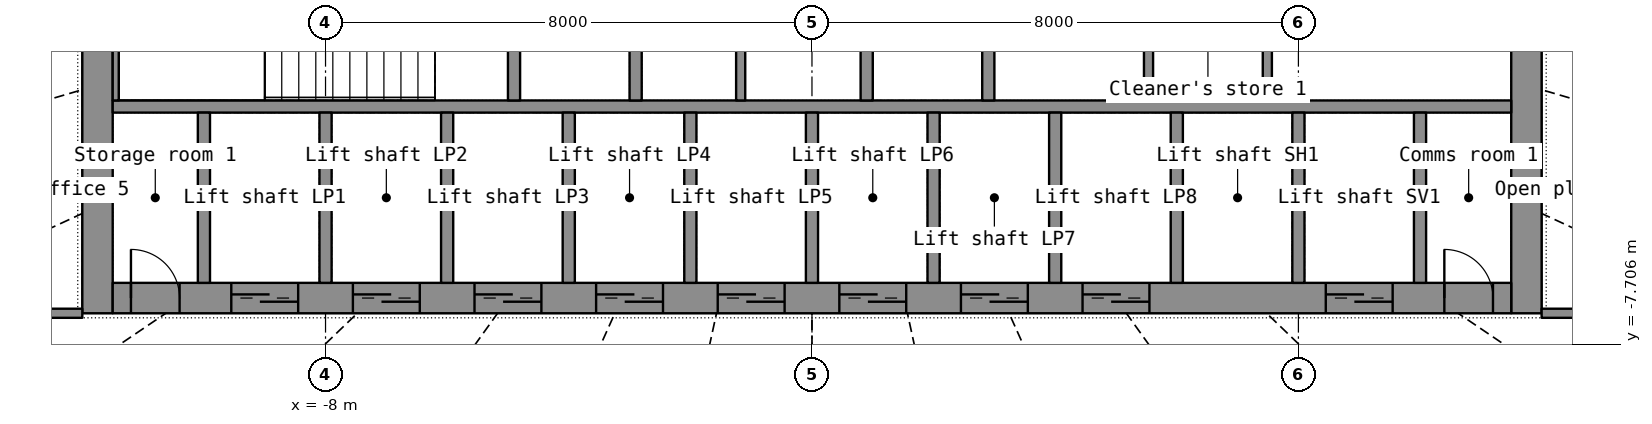
"""IFC4 building model, lengths in metres.
Left out: names, types, materials, properties, quantities, classifications, styles, units other than length and angle.
Written with IfcOpenShell. Run it as: python <this file> out.ifc"""

import sys

from ifc_helpers import new_model, si_unit, direction, frame, frame_2d, origin, place, context, subcontext, project, spatial, rectangle, extrude, element, fill, save


model = new_model("IFC4")
c1 = context("Model", 3, precision=1e-05, world=origin(), true_north=direction((0.0, 1.0)))
c2 = subcontext(c1, "Body", "Model", "MODEL_VIEW")
j1 = project(units=[si_unit("LENGTHUNIT", "METRE"), si_unit("PLANEANGLEUNIT", "RADIAN")], contexts=[c1])
p1 = place(None, origin())
s1 = spatial("IfcSite", under=j1, at=p1, CompositionType="ELEMENT")
p2 = place(p1, origin())
s2 = spatial("IfcBuilding", under=s1, at=p2, CompositionType="ELEMENT")
p3 = place(p2, frame((0.0, 0.0, 104.5)))
s3 = spatial("IfcBuildingStorey", under=s2, at=p3, CompositionType="ELEMENT", Elevation=104.5)
p4 = place(p3, frame((-11.75, -7.2, 0.0), z_axis=(0.0, 0.0, 1.0), x_axis=(0.0, 1.0, 0.0)))
e1 = element("IfcWall", 1, at=p4, inside=s3, PredefinedType="SHEAR", context=c2, shape_type="SweptSolid", body=[
    extrude(rectangle(XDim=14.4, YDim=0.5, at=frame_2d((7.2, 0.0))), origin(), (0.0, 0.0, 1.0), 3.3),
])
p5 = place(p4, frame((6.5, 0.0, 0.0)))
e2 = element("IfcOpeningElement", 2, at=p5, cuts=e1, PredefinedType="OPENING", context=c2, shape_type="SweptSolid", body=[
    extrude(rectangle(XDim=1.4, YDim=2.2, at=frame_2d((0.7, 1.1))), frame((0.0, 0.26, 0.0), z_axis=(0.0, -1.0, 0.0), x_axis=(1.0, 0.0, 0.0)), (0.0, 0.0, 1.0), 0.52),
])
p6 = place(p3, frame((11.75, -7.2, 0.0), z_axis=(0.0, 0.0, 1.0), x_axis=(0.0, 1.0, 0.0)))
e3 = element("IfcWall", 3, at=p6, inside=s3, PredefinedType="SHEAR", context=c2, shape_type="SweptSolid", body=[
    extrude(rectangle(XDim=14.4, YDim=0.5, at=frame_2d((7.2, 0.0))), origin(), (0.0, 0.0, 1.0), 3.3),
])
p7 = place(p6, frame((6.5, 0.0, 0.0)))
e4 = element("IfcOpeningElement", 4, at=p7, cuts=e3, PredefinedType="OPENING", context=c2, shape_type="SweptSolid", body=[
    extrude(rectangle(XDim=1.4, YDim=2.2, at=frame_2d((0.7, 1.1))), frame((0.0, 0.26, 0.0), z_axis=(0.0, -1.0, 0.0), x_axis=(1.0, 0.0, 0.0)), (0.0, 0.0, 1.0), 0.52),
])
p8 = place(p3, frame((-11.5, -6.95, 0.0), z_axis=(0.0, 0.0, 1.0), x_axis=(1.0, 0.0, 0.0)))
e5 = element("IfcWall", 5, at=p8, inside=s3, PredefinedType="SHEAR", context=c2, shape_type="SweptSolid", body=[
    extrude(rectangle(XDim=23.0, YDim=0.5, at=frame_2d((11.5, 0.0))), origin(), (0.0, 0.0, 1.0), 3.3),
])
p9 = place(p8, frame((1.95, 0.0, 0.0)))
e6 = element("IfcOpeningElement", 6, at=p9, cuts=e5, PredefinedType="OPENING", context=c2, shape_type="SweptSolid", body=[
    extrude(rectangle(XDim=1.1, YDim=2.2, at=frame_2d((0.55, 1.1))), frame((0.0, 0.26, 0.0), z_axis=(0.0, -1.0, 0.0), x_axis=(1.0, 0.0, 0.0)), (0.0, 0.0, 1.0), 0.52),
])
p10 = place(p8, frame((3.95, 0.0, 0.0)))
e7 = element("IfcOpeningElement", 7, at=p10, cuts=e5, PredefinedType="OPENING", context=c2, shape_type="SweptSolid", body=[
    extrude(rectangle(XDim=1.1, YDim=2.2, at=frame_2d((0.55, 1.1))), frame((0.0, 0.26, 0.0), z_axis=(0.0, -1.0, 0.0), x_axis=(1.0, 0.0, 0.0)), (0.0, 0.0, 1.0), 0.52),
])
p11 = place(p8, frame((5.95, 0.0, 0.0)))
e8 = element("IfcOpeningElement", 8, at=p11, cuts=e5, PredefinedType="OPENING", context=c2, shape_type="SweptSolid", body=[
    extrude(rectangle(XDim=1.1, YDim=2.2, at=frame_2d((0.55, 1.1))), frame((0.0, 0.26, 0.0), z_axis=(0.0, -1.0, 0.0), x_axis=(1.0, 0.0, 0.0)), (0.0, 0.0, 1.0), 0.52),
])
p12 = place(p8, frame((7.95, 0.0, 0.0)))
e9 = element("IfcOpeningElement", 9, at=p12, cuts=e5, PredefinedType="OPENING", context=c2, shape_type="SweptSolid", body=[
    extrude(rectangle(XDim=1.1, YDim=2.2, at=frame_2d((0.55, 1.1))), frame((0.0, 0.26, 0.0), z_axis=(0.0, -1.0, 0.0), x_axis=(1.0, 0.0, 0.0)), (0.0, 0.0, 1.0), 0.52),
])
p13 = place(p8, frame((9.95, 0.0, 0.0)))
e10 = element("IfcOpeningElement", 10, at=p13, cuts=e5, PredefinedType="OPENING", context=c2, shape_type="SweptSolid", body=[
    extrude(rectangle(XDim=1.1, YDim=2.2, at=frame_2d((0.55, 1.1))), frame((0.0, 0.26, 0.0), z_axis=(0.0, -1.0, 0.0), x_axis=(1.0, 0.0, 0.0)), (0.0, 0.0, 1.0), 0.52),
])
p14 = place(p8, frame((11.95, 0.0, 0.0)))
e11 = element("IfcOpeningElement", 11, at=p14, cuts=e5, PredefinedType="OPENING", context=c2, shape_type="SweptSolid", body=[
    extrude(rectangle(XDim=1.1, YDim=2.2, at=frame_2d((0.55, 1.1))), frame((0.0, 0.26, 0.0), z_axis=(0.0, -1.0, 0.0), x_axis=(1.0, 0.0, 0.0)), (0.0, 0.0, 1.0), 0.52),
])
p15 = place(p8, frame((13.95, 0.0, 0.0)))
e12 = element("IfcOpeningElement", 12, at=p15, cuts=e5, PredefinedType="OPENING", context=c2, shape_type="SweptSolid", body=[
    extrude(rectangle(XDim=1.1, YDim=2.2, at=frame_2d((0.55, 1.1))), frame((0.0, 0.26, 0.0), z_axis=(0.0, -1.0, 0.0), x_axis=(1.0, 0.0, 0.0)), (0.0, 0.0, 1.0), 0.52),
])
p16 = place(p8, frame((15.95, 0.0, 0.0)))
e13 = element("IfcOpeningElement", 13, at=p16, cuts=e5, PredefinedType="OPENING", context=c2, shape_type="SweptSolid", body=[
    extrude(rectangle(XDim=1.1, YDim=2.2, at=frame_2d((0.55, 1.1))), frame((0.0, 0.26, 0.0), z_axis=(0.0, -1.0, 0.0), x_axis=(1.0, 0.0, 0.0)), (0.0, 0.0, 1.0), 0.52),
])
p17 = place(p8, frame((19.95, 0.0, 0.0)))
e14 = element("IfcOpeningElement", 14, at=p17, cuts=e5, PredefinedType="OPENING", context=c2, shape_type="SweptSolid", body=[
    extrude(rectangle(XDim=1.1, YDim=2.2, at=frame_2d((0.55, 1.1))), frame((0.0, 0.26, 0.0), z_axis=(0.0, -1.0, 0.0), x_axis=(1.0, 0.0, 0.0)), (0.0, 0.0, 1.0), 0.52),
])
p18 = place(p8, frame((0.3, 0.0, 0.0)))
e15 = element("IfcOpeningElement", 15, at=p18, cuts=e5, PredefinedType="OPENING", context=c2, shape_type="SweptSolid", body=[
    extrude(rectangle(XDim=0.8, YDim=2.05, at=frame_2d((0.4, 1.025))), frame((0.0, 0.26, 0.0), z_axis=(0.0, -1.0, 0.0), x_axis=(1.0, 0.0, 0.0)), (0.0, 0.0, 1.0), 0.52),
])
p19 = place(p8, frame((21.9, 0.0, 0.0)))
e16 = element("IfcOpeningElement", 16, at=p19, cuts=e5, PredefinedType="OPENING", context=c2, shape_type="SweptSolid", body=[
    extrude(rectangle(XDim=0.8, YDim=2.05, at=frame_2d((0.4, 1.025))), frame((0.0, 0.26, 0.0), z_axis=(0.0, -1.0, 0.0), x_axis=(1.0, 0.0, 0.0)), (0.0, 0.0, 1.0), 0.52),
])
p20 = place(p3, frame((-11.5, -3.8, 0.0), z_axis=(0.0, 0.0, 1.0), x_axis=(1.0, 0.0, 0.0)))
e17 = element("IfcWall", 17, at=p20, inside=s3, PredefinedType="SHEAR", context=c2, shape_type="SweptSolid", body=[
    extrude(rectangle(XDim=23.0, YDim=0.2, at=frame_2d((11.5, 0.0))), origin(), (0.0, 0.0, 1.0), 3.3),
])
for number, where, z_axis, x_axis in (
    (18, (-10.0, -6.7, 0.0), (0.0, 0.0, 1.0), (0.0, 1.0, 0.0)),
    (19, (-8.0, -6.7, 0.0), (0.0, 0.0, 1.0), (0.0, 1.0, 0.0)),
    (20, (-6.0, -6.7, 0.0), (0.0, 0.0, 1.0), (0.0, 1.0, 0.0)),
    (21, (-4.0, -6.7, 0.0), (0.0, 0.0, 1.0), (0.0, 1.0, 0.0)),
    (22, (-2.0, -6.7, 0.0), (0.0, 0.0, 1.0), (0.0, 1.0, 0.0)),
    (23, (0.0, -6.7, 0.0), (0.0, 0.0, 1.0), (0.0, 1.0, 0.0)),
    (24, (2.0, -6.7, 0.0), (0.0, 0.0, 1.0), (0.0, 1.0, 0.0)),
    (25, (4.0, -6.7, 0.0), (0.0, 0.0, 1.0), (0.0, 1.0, 0.0)),
    (26, (6.0, -6.7, 0.0), (0.0, 0.0, 1.0), (0.0, 1.0, 0.0)),
    (27, (8.0, -6.7, 0.0), (0.0, 0.0, 1.0), (0.0, 1.0, 0.0)),
    (28, (10.0, -6.7, 0.0), (0.0, 0.0, 1.0), (0.0, 1.0, 0.0)),
):
    element("IfcWall", number, at=place(p3, frame(where, z_axis=z_axis, x_axis=x_axis)), inside=s3, PredefinedType="SHEAR", context=c2, shape_type="SweptSolid", body=[
        extrude(rectangle(XDim=2.8, YDim=0.2, at=frame_2d((1.4, 0.0))), origin(), (0.0, 0.0, 1.0), 3.3),
    ])
p21 = place(p3, frame((-2.9, -3.7, 0.0), z_axis=(0.0, 0.0, 1.0), x_axis=(0.0, 1.0, 0.0)))
e29 = element("IfcWall", 29, at=p21, inside=s3, PredefinedType="SHEAR", context=c2, shape_type="SweptSolid", body=[
    extrude(rectangle(XDim=7.4, YDim=0.2, at=frame_2d((3.7, 0.0))), origin(), (0.0, 0.0, 1.0), 3.3),
])
p22 = place(p21, frame((3.1, 0.0, 0.0)))
e30 = element("IfcOpeningElement", 30, at=p22, cuts=e29, PredefinedType="OPENING", context=c2, shape_type="SweptSolid", body=[
    extrude(rectangle(XDim=1.2, YDim=2.2, at=frame_2d((0.6, 1.1))), frame((0.0, 0.11, 0.0), z_axis=(0.0, -1.0, 0.0), x_axis=(1.0, 0.0, 0.0)), (0.0, 0.0, 1.0), 0.22),
])
p23 = place(p3, frame((2.9, -3.7, 0.0), z_axis=(0.0, 0.0, 1.0), x_axis=(0.0, 1.0, 0.0)))
e31 = element("IfcWall", 31, at=p23, inside=s3, PredefinedType="SHEAR", context=c2, shape_type="SweptSolid", body=[
    extrude(rectangle(XDim=7.4, YDim=0.2, at=frame_2d((3.7, 0.0))), origin(), (0.0, 0.0, 1.0), 3.3),
])
p24 = place(p23, frame((3.1, 0.0, 0.0)))
e32 = element("IfcOpeningElement", 32, at=p24, cuts=e31, PredefinedType="OPENING", context=c2, shape_type="SweptSolid", body=[
    extrude(rectangle(XDim=1.2, YDim=2.2, at=frame_2d((0.6, 1.1))), frame((0.0, 0.11, 0.0), z_axis=(0.0, -1.0, 0.0), x_axis=(1.0, 0.0, 0.0)), (0.0, 0.0, 1.0), 0.22),
])
p25 = place(p3, frame((0.9, -3.7, 0.0), z_axis=(0.0, 0.0, 1.0), x_axis=(0.0, 1.0, 0.0)))
e33 = element("IfcWall", 33, at=p25, inside=s3, PredefinedType="SHEAR", context=c2, shape_type="SweptSolid", body=[
    extrude(rectangle(XDim=2.35, YDim=0.2, at=frame_2d((1.175, 0.0))), origin(), (0.0, 0.0, 1.0), 3.3),
])
p26 = place(p3, frame((-11.45, -3.7, 0.0), z_axis=(0.0, 0.0, 1.0), x_axis=(0.0, 1.0, 0.0)))
e34 = element("IfcWall", 34, at=p26, inside=s3, PredefinedType="SHEAR", context=c2, shape_type="SweptSolid", body=[
    extrude(rectangle(XDim=2.35, YDim=0.1, at=frame_2d((1.175, 0.0))), origin(), (0.0, 0.0, 1.0), 3.3),
])
p27 = place(p3, frame((-4.9, -3.7, 0.0), z_axis=(0.0, 0.0, 1.0), x_axis=(0.0, 1.0, 0.0)))
e35 = element("IfcWall", 35, at=p27, inside=s3, PredefinedType="SHEAR", context=c2, shape_type="SweptSolid", body=[
    extrude(rectangle(XDim=2.35, YDim=0.2, at=frame_2d((1.175, 0.0))), origin(), (0.0, 0.0, 1.0), 3.3),
])
for number, where, z_axis, x_axis in (
    (36, (5.535, -3.7, 0.0), (0.0, 0.0, 1.0), (0.0, 1.0, 0.0)),
    (37, (7.489, -3.7, 0.0), (0.0, 0.0, 1.0), (0.0, 1.0, 0.0)),
    (38, (-1.173, -3.7, 0.0), (0.0, 0.0, 1.0), (0.0, 1.0, 0.0)),
):
    element("IfcWall", number, at=place(p3, frame(where, z_axis=z_axis, x_axis=x_axis)), inside=s3, PredefinedType="PARTITIONING", context=c2, shape_type="SweptSolid", body=[
        extrude(rectangle(XDim=2.35, YDim=0.15, at=frame_2d((1.175, 0.0))), origin(), (0.0, 0.0, 1.0), 3.3),
    ])
for number, where, z_axis, x_axis in (
    (39, (-12.0, -7.2, 0.0), (0.0, 0.0, 1.0), (-1.0, 0.0, 0.0)),
    (40, (15.923, -7.2, 0.0), (0.0, 0.0, 1.0), (-1.0, 0.0, 0.0)),
):
    element("IfcWall", number, at=place(p3, frame(where, z_axis=z_axis, x_axis=x_axis)), inside=s3, PredefinedType="PARTITIONING", context=c2, shape_type="SweptSolid", body=[
        extrude(rectangle(XDim=3.923, YDim=0.15, at=frame_2d((1.961, 0.0))), origin(), (0.0, 0.0, 1.0), 2.4),
    ])
p28 = place(p9, origin())
e41 = element("IfcDoor", 41, at=p28, inside=s3, OperationType="DOUBLE_DOOR_SLIDING", PredefinedType="DOOR", context=c2, shape_type="SweptSolid", body=[
    extrude(rectangle(XDim=1.1, YDim=2.2, at=frame_2d((0.55, 1.1))), frame((0.0, 0.025, 0.0), z_axis=(0.0, -1.0, 0.0), x_axis=(1.0, 0.0, 0.0)), (0.0, 0.0, 1.0), 0.05),
])
fill(e6, e41)
p29 = place(p10, origin())
e42 = element("IfcDoor", 42, at=p29, inside=s3, OperationType="DOUBLE_DOOR_SLIDING", PredefinedType="DOOR", context=c2, shape_type="SweptSolid", body=[
    extrude(rectangle(XDim=1.1, YDim=2.2, at=frame_2d((0.55, 1.1))), frame((0.0, 0.025, 0.0), z_axis=(0.0, -1.0, 0.0), x_axis=(1.0, 0.0, 0.0)), (0.0, 0.0, 1.0), 0.05),
])
fill(e7, e42)
p30 = place(p11, origin())
e43 = element("IfcDoor", 43, at=p30, inside=s3, OperationType="DOUBLE_DOOR_SLIDING", PredefinedType="DOOR", context=c2, shape_type="SweptSolid", body=[
    extrude(rectangle(XDim=1.1, YDim=2.2, at=frame_2d((0.55, 1.1))), frame((0.0, 0.025, 0.0), z_axis=(0.0, -1.0, 0.0), x_axis=(1.0, 0.0, 0.0)), (0.0, 0.0, 1.0), 0.05),
])
fill(e8, e43)
p31 = place(p12, origin())
e44 = element("IfcDoor", 44, at=p31, inside=s3, OperationType="DOUBLE_DOOR_SLIDING", PredefinedType="DOOR", context=c2, shape_type="SweptSolid", body=[
    extrude(rectangle(XDim=1.1, YDim=2.2, at=frame_2d((0.55, 1.1))), frame((0.0, 0.025, 0.0), z_axis=(0.0, -1.0, 0.0), x_axis=(1.0, 0.0, 0.0)), (0.0, 0.0, 1.0), 0.05),
])
fill(e9, e44)
p32 = place(p13, origin())
e45 = element("IfcDoor", 45, at=p32, inside=s3, OperationType="DOUBLE_DOOR_SLIDING", PredefinedType="DOOR", context=c2, shape_type="SweptSolid", body=[
    extrude(rectangle(XDim=1.1, YDim=2.2, at=frame_2d((0.55, 1.1))), frame((0.0, 0.025, 0.0), z_axis=(0.0, -1.0, 0.0), x_axis=(1.0, 0.0, 0.0)), (0.0, 0.0, 1.0), 0.05),
])
fill(e10, e45)
p33 = place(p14, origin())
e46 = element("IfcDoor", 46, at=p33, inside=s3, OperationType="DOUBLE_DOOR_SLIDING", PredefinedType="DOOR", context=c2, shape_type="SweptSolid", body=[
    extrude(rectangle(XDim=1.1, YDim=2.2, at=frame_2d((0.55, 1.1))), frame((0.0, 0.025, 0.0), z_axis=(0.0, -1.0, 0.0), x_axis=(1.0, 0.0, 0.0)), (0.0, 0.0, 1.0), 0.05),
])
fill(e11, e46)
p34 = place(p15, origin())
e47 = element("IfcDoor", 47, at=p34, inside=s3, OperationType="DOUBLE_DOOR_SLIDING", PredefinedType="DOOR", context=c2, shape_type="SweptSolid", body=[
    extrude(rectangle(XDim=1.1, YDim=2.2, at=frame_2d((0.55, 1.1))), frame((0.0, 0.025, 0.0), z_axis=(0.0, -1.0, 0.0), x_axis=(1.0, 0.0, 0.0)), (0.0, 0.0, 1.0), 0.05),
])
fill(e12, e47)
p35 = place(p16, origin())
e48 = element("IfcDoor", 48, at=p35, inside=s3, OperationType="DOUBLE_DOOR_SLIDING", PredefinedType="DOOR", context=c2, shape_type="SweptSolid", body=[
    extrude(rectangle(XDim=1.1, YDim=2.2, at=frame_2d((0.55, 1.1))), frame((0.0, 0.025, 0.0), z_axis=(0.0, -1.0, 0.0), x_axis=(1.0, 0.0, 0.0)), (0.0, 0.0, 1.0), 0.05),
])
fill(e13, e48)
p36 = place(p17, origin())
e49 = element("IfcDoor", 49, at=p36, inside=s3, OperationType="DOUBLE_DOOR_SLIDING", PredefinedType="DOOR", context=c2, shape_type="SweptSolid", body=[
    extrude(rectangle(XDim=1.1, YDim=2.2, at=frame_2d((0.55, 1.1))), frame((0.0, 0.025, 0.0), z_axis=(0.0, -1.0, 0.0), x_axis=(1.0, 0.0, 0.0)), (0.0, 0.0, 1.0), 0.05),
])
fill(e14, e49)
p37 = place(p18, origin())
e50 = element("IfcDoor", 50, at=p37, inside=s3, OperationType="SINGLE_SWING_LEFT", PredefinedType="DOOR", context=c2, shape_type="SweptSolid", body=[
    extrude(rectangle(XDim=0.8, YDim=2.05, at=frame_2d((0.4, 1.025))), frame((0.0, 0.025, 0.0), z_axis=(0.0, -1.0, 0.0), x_axis=(1.0, 0.0, 0.0)), (0.0, 0.0, 1.0), 0.05),
])
fill(e15, e50)
p38 = place(p19, origin())
e51 = element("IfcDoor", 51, at=p38, inside=s3, OperationType="SINGLE_SWING_LEFT", PredefinedType="DOOR", context=c2, shape_type="SweptSolid", body=[
    extrude(rectangle(XDim=0.8, YDim=2.05, at=frame_2d((0.4, 1.025))), frame((0.0, 0.025, 0.0), z_axis=(0.0, -1.0, 0.0), x_axis=(1.0, 0.0, 0.0)), (0.0, 0.0, 1.0), 0.05),
])
fill(e16, e51)
save(model, sys.argv[1])
